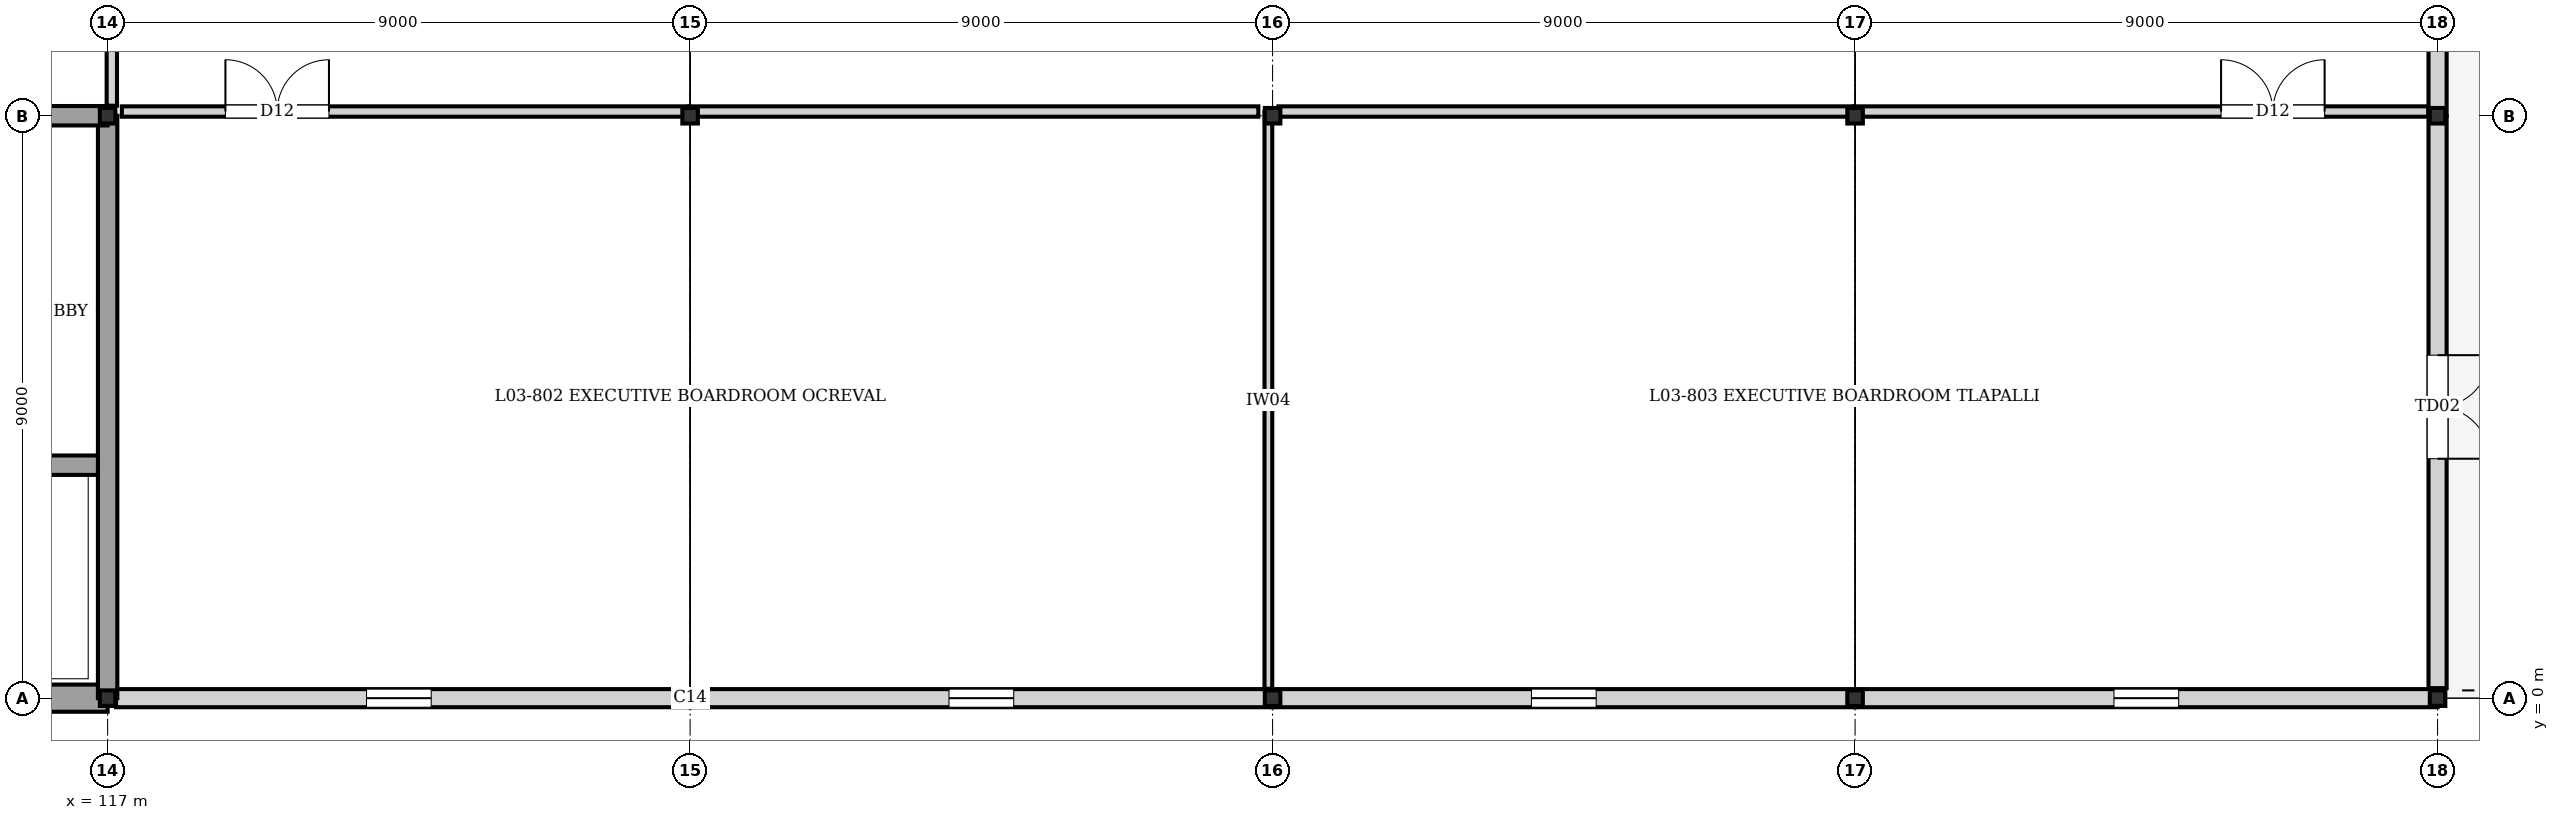
"""IFC4 building model, lengths in metres.
Left out: names, types, materials, properties, quantities, classifications, styles, units other than length and angle.
Written with IfcOpenShell. Run it as: python <this file> out.ifc"""

import sys

from ifc_helpers import new_model, si_unit, direction, frame, frame_2d, origin, origin_2d, place, context, subcontext, project, spatial, rectangle, i_section, extrude, element, fill, save


model = new_model("IFC4")
c1 = context("Model", 3, precision=1e-05, world=origin(), true_north=direction((0.0, 1.0)))
c2 = subcontext(c1, "Body", "Model", "MODEL_VIEW")
j1 = project(units=[si_unit("LENGTHUNIT", "METRE"), si_unit("PLANEANGLEUNIT", "RADIAN")], contexts=[c1])
p1 = place(None, origin())
s1 = spatial("IfcSite", under=j1, at=p1, CompositionType="ELEMENT")
p2 = place(p1, origin())
s2 = spatial("IfcBuilding", under=s1, at=p2, CompositionType="ELEMENT")
p3 = place(p2, frame((0.0, 0.0, 11.52)))
s3 = spatial("IfcBuildingStorey", under=s2, at=p3, CompositionType="ELEMENT", Elevation=11.52)
for number, where, z_axis, x_axis in (
    (1, (117.0, 0.0, 0.0), (0.0, 0.0, 1.0), (1.0, 0.0, 0.0)),
    (2, (117.0, 9.0, 0.0), (0.0, 0.0, 1.0), (1.0, 0.0, 0.0)),
    (3, (126.0, 0.0, 0.0), (0.0, 0.0, 1.0), (1.0, 0.0, 0.0)),
    (4, (126.0, 9.0, 0.0), (0.0, 0.0, 1.0), (1.0, 0.0, 0.0)),
    (5, (135.0, 0.0, 0.0), (0.0, 0.0, 1.0), (1.0, 0.0, 0.0)),
    (6, (135.0, 9.0, 0.0), (0.0, 0.0, 1.0), (1.0, 0.0, 0.0)),
    (7, (144.0, 0.0, 0.0), (0.0, 0.0, 1.0), (1.0, 0.0, 0.0)),
    (8, (144.0, 9.0, 0.0), (0.0, 0.0, 1.0), (1.0, 0.0, 0.0)),
    (9, (153.0, 0.0, 0.0), (0.0, 0.0, 1.0), (1.0, 0.0, 0.0)),
    (10, (153.0, 9.0, 0.0), (0.0, 0.0, 1.0), (1.0, 0.0, 0.0)),
):
    element("IfcColumn", number, at=place(p3, frame(where, z_axis=z_axis, x_axis=x_axis)), inside=s3, PredefinedType="COLUMN", context=c2, shape_type="SweptSolid", body=[
        extrude(i_section(OverallWidth=0.24, OverallDepth=0.24, WebThickness=0.01, FlangeThickness=0.017, at=origin_2d()), origin(), (0.0, 0.0, 1.0), 3.04),
    ])
p4 = place(p3, frame((153.0, 17.845, 0.0), z_axis=(0.0, 0.0, 1.0), x_axis=(0.0, -1.0, 0.0)))
e11 = element("IfcWall", 11, at=p4, inside=s3, PredefinedType="SOLIDWALL", context=c2, shape_type="SweptSolid", body=[
    extrude(rectangle(XDim=8.845, YDim=0.28, at=frame_2d((4.422, 0.0))), origin(), (0.0, 0.0, 1.0), 2.39),
])
p5 = place(p4, frame((3.845, 0.0, 0.4)))
e12 = element("IfcOpeningElement", 12, at=p5, cuts=e11, PredefinedType="OPENING", context=c2, shape_type="SweptSolid", body=[
    extrude(rectangle(XDim=1.0, YDim=1.6, at=frame_2d((0.5, 0.8))), frame((0.0, 0.15, 0.0), z_axis=(0.0, -1.0, 0.0), x_axis=(1.0, 0.0, 0.0)), (0.0, 0.0, 1.0), 0.3),
])
p6 = place(p3, frame((153.0, 9.0, 0.0), z_axis=(0.0, 0.0, 1.0), x_axis=(0.0, -1.0, 0.0)))
e13 = element("IfcWall", 13, at=p6, inside=s3, PredefinedType="SOLIDWALL", context=c2, shape_type="SweptSolid", body=[
    extrude(rectangle(XDim=8.845, YDim=0.28, at=frame_2d((4.422, 0.0))), origin(), (0.0, 0.0, 1.0), 2.45),
])
p7 = place(p6, frame((3.7, 0.0, 0.0)))
e14 = element("IfcOpeningElement", 14, at=p7, cuts=e13, PredefinedType="OPENING", context=c2, shape_type="SweptSolid", body=[
    extrude(rectangle(XDim=1.6, YDim=2.25, at=frame_2d((0.8, 1.125))), frame((0.0, 0.15, 0.0), z_axis=(0.0, -1.0, 0.0), x_axis=(1.0, 0.0, 0.0)), (0.0, 0.0, 1.0), 0.3),
])
p8 = place(p3, frame((153.0, 0.0, 0.0), z_axis=(0.0, 0.0, 1.0), x_axis=(-1.0, 0.0, 0.0)))
e15 = element("IfcWall", 15, at=p8, inside=s3, PredefinedType="SOLIDWALL", context=c2, shape_type="SweptSolid", body=[
    extrude(rectangle(XDim=9.0, YDim=0.28, at=frame_2d((4.5, 0.0))), origin(), (0.0, 0.0, 1.0), 2.48),
])
p9 = place(p8, frame((4.0, 0.0, 0.4)))
e16 = element("IfcOpeningElement", 16, at=p9, cuts=e15, PredefinedType="OPENING", context=c2, shape_type="SweptSolid", body=[
    extrude(rectangle(XDim=1.0, YDim=1.6, at=frame_2d((0.5, 0.8))), frame((0.0, 0.15, 0.0), z_axis=(0.0, -1.0, 0.0), x_axis=(1.0, 0.0, 0.0)), (0.0, 0.0, 1.0), 0.3),
])
p10 = place(p3, frame((144.0, 0.0, 0.0), z_axis=(0.0, 0.0, 1.0), x_axis=(-1.0, 0.0, 0.0)))
e17 = element("IfcWall", 17, at=p10, inside=s3, PredefinedType="SOLIDWALL", context=c2, shape_type="SweptSolid", body=[
    extrude(rectangle(XDim=9.0, YDim=0.28, at=frame_2d((4.5, 0.0))), origin(), (0.0, 0.0, 1.0), 2.55),
])
p11 = place(p10, frame((4.0, 0.0, 0.4)))
e18 = element("IfcOpeningElement", 18, at=p11, cuts=e17, PredefinedType="OPENING", context=c2, shape_type="SweptSolid", body=[
    extrude(rectangle(XDim=1.0, YDim=1.6, at=frame_2d((0.5, 0.8))), frame((0.0, 0.15, 0.0), z_axis=(0.0, -1.0, 0.0), x_axis=(1.0, 0.0, 0.0)), (0.0, 0.0, 1.0), 0.3),
])
p12 = place(p3, frame((135.0, 0.0, 0.0), z_axis=(0.0, 0.0, 1.0), x_axis=(-1.0, 0.0, 0.0)))
e19 = element("IfcWall", 19, at=p12, inside=s3, PredefinedType="SOLIDWALL", context=c2, shape_type="SweptSolid", body=[
    extrude(rectangle(XDim=9.0, YDim=0.28, at=frame_2d((4.5, 0.0))), origin(), (0.0, 0.0, 1.0), 2.38),
])
p13 = place(p12, frame((4.0, 0.0, 0.4)))
e20 = element("IfcOpeningElement", 20, at=p13, cuts=e19, PredefinedType="OPENING", context=c2, shape_type="SweptSolid", body=[
    extrude(rectangle(XDim=1.0, YDim=1.6, at=frame_2d((0.5, 0.8))), frame((0.0, 0.15, 0.0), z_axis=(0.0, -1.0, 0.0), x_axis=(1.0, 0.0, 0.0)), (0.0, 0.0, 1.0), 0.3),
])
p14 = place(p3, frame((126.0, 0.0, 0.0), z_axis=(0.0, 0.0, 1.0), x_axis=(-1.0, 0.0, 0.0)))
e21 = element("IfcWall", 21, at=p14, inside=s3, PredefinedType="SOLIDWALL", context=c2, shape_type="SweptSolid", body=[
    extrude(rectangle(XDim=8.87, YDim=0.28, at=frame_2d((4.435, 0.0))), origin(), (0.0, 0.0, 1.0), 2.42),
])
p15 = place(p14, frame((4.0, 0.0, 0.4)))
e22 = element("IfcOpeningElement", 22, at=p15, cuts=e21, PredefinedType="OPENING", context=c2, shape_type="SweptSolid", body=[
    extrude(rectangle(XDim=1.0, YDim=1.6, at=frame_2d((0.5, 0.8))), frame((0.0, 0.15, 0.0), z_axis=(0.0, -1.0, 0.0), x_axis=(1.0, 0.0, 0.0)), (0.0, 0.0, 1.0), 0.3),
])
p16 = place(p3, frame((117.0, 0.0, 0.0), z_axis=(0.0, 0.0, 1.0), x_axis=(-1.0, 0.0, 0.0)))
e23 = element("IfcWall", 23, at=p16, inside=s3, PredefinedType="SOLIDWALL", context=c2, shape_type="SweptSolid", body=[
    extrude(rectangle(XDim=9.0, YDim=0.42, at=frame_2d((4.5, 0.0))), origin(), (0.0, 0.0, 1.0), 2.79),
])
p17 = place(p3, frame((117.0, 0.0, 0.0), z_axis=(0.0, 0.0, 1.0), x_axis=(0.0, 1.0, 0.0)))
e24 = element("IfcWall", 24, at=p17, inside=s3, PredefinedType="SHEAR", context=c2, shape_type="SweptSolid", body=[
    extrude(rectangle(XDim=9.0, YDim=0.3, at=frame_2d((4.5, 0.0))), origin(), (0.0, 0.0, 1.0), 2.79),
])
p18 = place(p3, frame((108.0, 9.0, 0.0), z_axis=(0.0, 0.0, 1.0), x_axis=(1.0, 0.0, 0.0)))
e25 = element("IfcWall", 25, at=p18, inside=s3, PredefinedType="SHEAR", context=c2, shape_type="SweptSolid", body=[
    extrude(rectangle(XDim=9.0, YDim=0.3, at=frame_2d((4.5, 0.0))), origin(), (0.0, 0.0, 1.0), 2.79),
])
p19 = place(p18, frame((6.05, 0.0, 0.0)))
e26 = element("IfcOpeningElement", 26, at=p19, cuts=e25, PredefinedType="OPENING", context=c2, shape_type="SweptSolid", body=[
    extrude(rectangle(XDim=1.4, YDim=2.02, at=frame_2d((0.7, 1.01))), frame((0.0, 0.16, 0.0), z_axis=(0.0, -1.0, 0.0), x_axis=(1.0, 0.0, 0.0)), (0.0, 0.0, 1.0), 0.32),
])
p20 = place(p3, frame((112.65, 3.6, 0.0), z_axis=(0.0, 0.0, 1.0), x_axis=(1.0, 0.0, 0.0)))
e27 = element("IfcWall", 27, at=p20, inside=s3, PredefinedType="SHEAR", context=c2, shape_type="SweptSolid", body=[
    extrude(rectangle(XDim=4.2, YDim=0.3, at=frame_2d((2.1, 0.0))), origin(), (0.0, 0.0, 1.0), 2.79),
])
p21 = place(p20, frame((1.5, 0.0, 0.0)))
e28 = element("IfcOpeningElement", 28, at=p21, cuts=e27, PredefinedType="OPENING", context=c2, shape_type="SweptSolid", body=[
    extrude(rectangle(XDim=1.2, YDim=2.2, at=frame_2d((0.6, 1.1))), frame((0.0, 0.16, 0.0), z_axis=(0.0, -1.0, 0.0), x_axis=(1.0, 0.0, 0.0)), (0.0, 0.0, 1.0), 0.32),
])
p22 = place(p3, frame((134.935, 0.145, 0.0), z_axis=(0.0, 0.0, 1.0), x_axis=(0.0, 1.0, 0.0)))
e29 = element("IfcWall", 29, at=p22, inside=s3, PredefinedType="PARTITIONING", context=c2, shape_type="SweptSolid", body=[
    extrude(rectangle(XDim=8.915, YDim=0.12, at=frame_2d((4.458, 0.0))), origin(), (0.0, 0.0, 1.0), 2.09),
])
p23 = place(p3, frame((117.065, 9.155, 0.0), z_axis=(0.0, 0.0, 1.0), x_axis=(0.0, 1.0, 0.0)))
e30 = element("IfcWall", 30, at=p23, inside=s3, PredefinedType="PARTITIONING", context=c2, shape_type="SweptSolid", body=[
    extrude(rectangle(XDim=2.775, YDim=0.16, at=frame_2d((1.387, 0.0))), origin(), (0.0, 0.0, 1.0), 2.19),
])
p24 = place(p23, frame((0.97, 0.0, 0.0)))
e31 = element("IfcOpeningElement", 31, at=p24, cuts=e30, PredefinedType="OPENING", context=c2, shape_type="SweptSolid", body=[
    extrude(rectangle(XDim=1.5, YDim=2.1, at=frame_2d((0.75, 1.05))), frame((0.0, 0.09, 0.0), z_axis=(0.0, -1.0, 0.0), x_axis=(1.0, 0.0, 0.0)), (0.0, 0.0, 1.0), 0.18),
])
p25 = place(p3, frame((117.22, 9.065, 0.0), z_axis=(0.0, 0.0, 1.0), x_axis=(1.0, 0.0, 0.0)))
e32 = element("IfcWall", 32, at=p25, inside=s3, PredefinedType="PARTITIONING", context=c2, shape_type="SweptSolid", body=[
    extrude(rectangle(XDim=8.76, YDim=0.16, at=frame_2d((4.38, 0.0))), origin(), (0.0, 0.0, 1.0), 2.49),
])
p26 = place(p25, frame((1.6, 0.0, 0.0)))
e33 = element("IfcOpeningElement", 33, at=p26, cuts=e32, PredefinedType="OPENING", context=c2, shape_type="SweptSolid", body=[
    extrude(rectangle(XDim=1.6, YDim=2.3, at=frame_2d((0.8, 1.15))), frame((0.0, 0.09, 0.0), z_axis=(0.0, -1.0, 0.0), x_axis=(1.0, 0.0, 0.0)), (0.0, 0.0, 1.0), 0.18),
])
p27 = place(p3, frame((135.09, 9.065, 0.0), z_axis=(0.0, 0.0, 1.0), x_axis=(1.0, 0.0, 0.0)))
e34 = element("IfcWall", 34, at=p27, inside=s3, PredefinedType="PARTITIONING", context=c2, shape_type="SweptSolid", body=[
    extrude(rectangle(XDim=8.89, YDim=0.16, at=frame_2d((4.445, 0.0))), origin(), (0.0, 0.0, 1.0), 2.39),
])
p28 = place(p3, frame((125.98, 9.065, 0.0), z_axis=(0.0, 0.0, 1.0), x_axis=(1.0, 0.0, 0.0)))
e35 = element("IfcWall", 35, at=p28, inside=s3, PredefinedType="PARTITIONING", context=c2, shape_type="SweptSolid", body=[
    extrude(rectangle(XDim=8.8, YDim=0.16, at=frame_2d((4.4, 0.0))), origin(), (0.0, 0.0, 1.0), 2.45),
])
p29 = place(p3, frame((143.98, 9.065, 0.0), z_axis=(0.0, 0.0, 1.0), x_axis=(1.0, 0.0, 0.0)))
e36 = element("IfcWall", 36, at=p29, inside=s3, PredefinedType="PARTITIONING", context=c2, shape_type="SweptSolid", body=[
    extrude(rectangle(XDim=8.875, YDim=0.16, at=frame_2d((4.438, 0.0))), origin(), (0.0, 0.0, 1.0), 2.34),
])
p30 = place(p29, frame((5.675, 0.0, 0.0)))
e37 = element("IfcOpeningElement", 37, at=p30, cuts=e36, PredefinedType="OPENING", context=c2, shape_type="SweptSolid", body=[
    extrude(rectangle(XDim=1.6, YDim=2.3, at=frame_2d((0.8, 1.15))), frame((0.0, 0.09, 0.0), z_axis=(0.0, -1.0, 0.0), x_axis=(1.0, 0.0, 0.0)), (0.0, 0.0, 1.0), 0.18),
])
p31 = place(p7, origin())
e38 = element("IfcDoor", 38, at=p31, inside=s3, OperationType="DOUBLE_DOOR_SINGLE_SWING", PredefinedType="DOOR", context=c2, shape_type="SweptSolid", body=[
    extrude(rectangle(XDim=1.6, YDim=2.25, at=frame_2d((0.8, 1.125))), frame((0.0, 0.025, 0.0), z_axis=(0.0, -1.0, 0.0), x_axis=(1.0, 0.0, 0.0)), (0.0, 0.0, 1.0), 0.05),
])
fill(e14, e38)
p32 = place(p9, origin())
e39 = element("IfcWindow", 39, at=p32, inside=s3, PartitioningType="SINGLE_PANEL", PredefinedType="WINDOW", context=c2, shape_type="SweptSolid", body=[
    extrude(rectangle(XDim=1.0, YDim=1.6, at=frame_2d((0.5, 0.8))), frame((0.0, 0.03, 0.0), z_axis=(0.0, -1.0, 0.0), x_axis=(1.0, 0.0, 0.0)), (0.0, 0.0, 1.0), 0.06),
])
fill(e16, e39)
p33 = place(p11, origin())
e40 = element("IfcWindow", 40, at=p33, inside=s3, PartitioningType="SINGLE_PANEL", PredefinedType="WINDOW", context=c2, shape_type="SweptSolid", body=[
    extrude(rectangle(XDim=1.0, YDim=1.6, at=frame_2d((0.5, 0.8))), frame((0.0, 0.03, 0.0), z_axis=(0.0, -1.0, 0.0), x_axis=(1.0, 0.0, 0.0)), (0.0, 0.0, 1.0), 0.06),
])
fill(e18, e40)
p34 = place(p13, origin())
e41 = element("IfcWindow", 41, at=p34, inside=s3, PartitioningType="SINGLE_PANEL", PredefinedType="WINDOW", context=c2, shape_type="SweptSolid", body=[
    extrude(rectangle(XDim=1.0, YDim=1.6, at=frame_2d((0.5, 0.8))), frame((0.0, 0.03, 0.0), z_axis=(0.0, -1.0, 0.0), x_axis=(1.0, 0.0, 0.0)), (0.0, 0.0, 1.0), 0.06),
])
fill(e20, e41)
p35 = place(p15, origin())
e42 = element("IfcWindow", 42, at=p35, inside=s3, PartitioningType="SINGLE_PANEL", PredefinedType="WINDOW", context=c2, shape_type="SweptSolid", body=[
    extrude(rectangle(XDim=1.0, YDim=1.6, at=frame_2d((0.5, 0.8))), frame((0.0, 0.03, 0.0), z_axis=(0.0, -1.0, 0.0), x_axis=(1.0, 0.0, 0.0)), (0.0, 0.0, 1.0), 0.06),
])
fill(e22, e42)
p36 = place(p26, origin())
e43 = element("IfcDoor", 43, at=p36, inside=s3, OperationType="DOUBLE_DOOR_SINGLE_SWING", PredefinedType="DOOR", context=c2, shape_type="SweptSolid", body=[
    extrude(rectangle(XDim=1.6, YDim=2.3, at=frame_2d((0.8, 1.15))), frame((0.0, 0.025, 0.0), z_axis=(0.0, -1.0, 0.0), x_axis=(1.0, 0.0, 0.0)), (0.0, 0.0, 1.0), 0.05),
])
fill(e33, e43)
p37 = place(p30, origin())
e44 = element("IfcDoor", 44, at=p37, inside=s3, OperationType="DOUBLE_DOOR_SINGLE_SWING", PredefinedType="DOOR", context=c2, shape_type="SweptSolid", body=[
    extrude(rectangle(XDim=1.6, YDim=2.3, at=frame_2d((0.8, 1.15))), frame((0.0, 0.025, 0.0), z_axis=(0.0, -1.0, 0.0), x_axis=(1.0, 0.0, 0.0)), (0.0, 0.0, 1.0), 0.05),
])
fill(e37, e44)
save(model, sys.argv[1])
